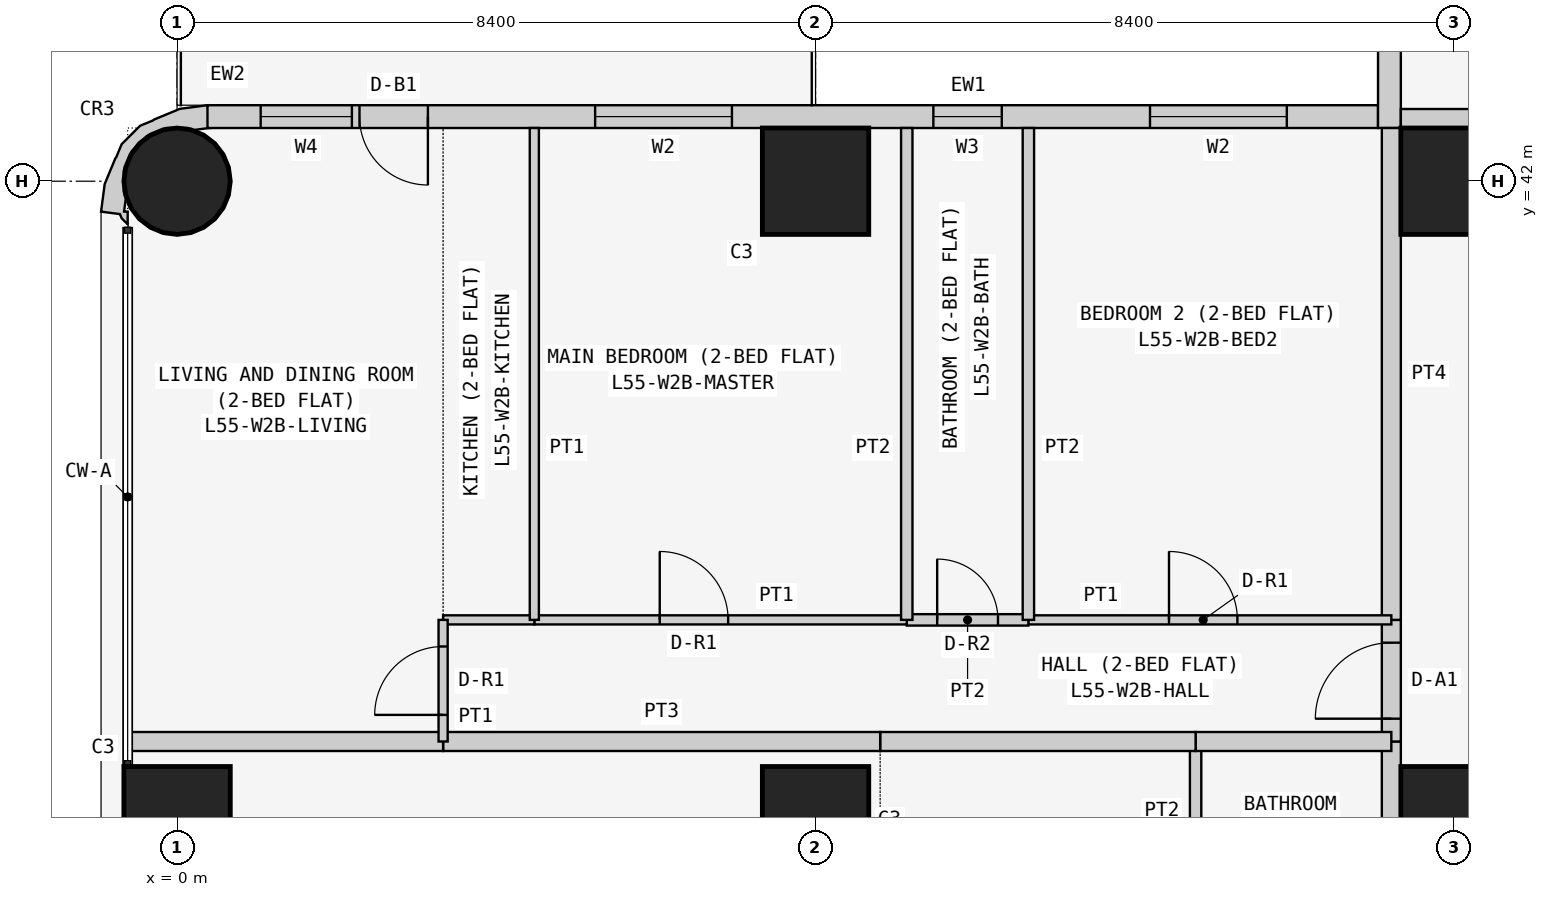
"""IFC4 building model, lengths in metres.
Left out: names, types, materials, properties, quantities, classifications, styles, units other than length and angle.
Written with IfcOpenShell. Run it as: python <this file> out.ifc"""

import sys

from ifc_helpers import new_model, si_unit, direction, frame, frame_2d, origin, origin_2d, place, context, subcontext, project, spatial, polyline, rectangle, circle, outline, extrude, element, fill, save


model = new_model("IFC4")
c1 = context("Model", 3, precision=1e-05, world=origin(), true_north=direction((0.0, 1.0)))
c2 = subcontext(c1, "Body", "Model", "MODEL_VIEW")
j1 = project(units=[si_unit("LENGTHUNIT", "METRE"), si_unit("PLANEANGLEUNIT", "RADIAN")], contexts=[c1])
p1 = place(None, origin())
s1 = spatial("IfcSite", under=j1, at=p1, CompositionType="ELEMENT")
p2 = place(p1, origin())
s2 = spatial("IfcBuilding", under=s1, at=p2, CompositionType="ELEMENT")
p3 = place(p2, frame((0.0, 0.0, 212.1)))
s3 = spatial("IfcBuildingStorey", under=s2, at=p3, CompositionType="ELEMENT", Elevation=212.1)
p4 = place(p3, frame((0.0, 33.6, 0.0), z_axis=(0.0, 0.0, 1.0), x_axis=(1.0, 0.0, 0.0)))
e1 = element("IfcColumn", 1, at=p4, inside=s3, PredefinedType="COLUMN", context=c2, shape_type="SweptSolid", body=[
    extrude(rectangle(XDim=1.4, YDim=1.4, at=origin_2d()), origin(), (0.0, 0.0, 1.0), 3.6),
])
p5 = place(p3, frame((0.0, 42.0, 0.0), z_axis=(0.0, 0.0, 1.0), x_axis=(1.0, 0.0, 0.0)))
e2 = element("IfcColumn", 2, at=p5, inside=s3, PredefinedType="COLUMN", context=c2, shape_type="SweptSolid", body=[
    extrude(circle(Radius=0.7, at=origin_2d()), origin(), (0.0, 0.0, 1.0), 3.6),
])
for number, where, z_axis, x_axis in (
    (3, (8.4, 33.6, 0.0), (0.0, 0.0, 1.0), (1.0, 0.0, 0.0)),
    (4, (8.4, 42.0, 0.0), (0.0, 0.0, 1.0), (1.0, 0.0, 0.0)),
    (5, (16.8, 33.6, 0.0), (0.0, 0.0, 1.0), (1.0, 0.0, 0.0)),
    (6, (16.8, 42.0, 0.0), (0.0, 0.0, 1.0), (1.0, 0.0, 0.0)),
):
    element("IfcColumn", number, at=place(p3, frame(where, z_axis=z_axis, x_axis=x_axis)), inside=s3, PredefinedType="COLUMN", context=c2, shape_type="SweptSolid", body=[
        extrude(rectangle(XDim=1.4, YDim=1.4, at=origin_2d()), origin(), (0.0, 0.0, 1.0), 3.6),
    ])
p6 = place(p3, frame((15.8, 42.85, 0.0), z_axis=(0.0, 0.0, 1.0), x_axis=(-1.0, 0.0, 0.0)))
e7 = element("IfcWall", 7, at=p6, inside=s3, PredefinedType="SOLIDWALL", context=c2, shape_type="SweptSolid", body=[
    extrude(rectangle(XDim=15.4, YDim=0.3, at=frame_2d((7.7, 0.0))), origin(), (0.0, 0.0, 1.0), 3.45),
])
p7 = place(p6, frame((1.2, 0.0, 0.9)))
e8 = element("IfcOpeningElement", 8, at=p7, cuts=e7, PredefinedType="OPENING", context=c2, shape_type="SweptSolid", body=[
    extrude(rectangle(XDim=1.8, YDim=1.5, at=frame_2d((0.9, 0.75))), frame((0.0, 0.16, 0.0), z_axis=(0.0, -1.0, 0.0), x_axis=(1.0, 0.0, 0.0)), (0.0, 0.0, 1.0), 0.32),
])
p8 = place(p6, frame((4.95, 0.0, 1.5)))
e9 = element("IfcOpeningElement", 9, at=p8, cuts=e7, PredefinedType="OPENING", context=c2, shape_type="SweptSolid", body=[
    extrude(rectangle(XDim=0.9, YDim=0.7, at=frame_2d((0.45, 0.35))), frame((0.0, 0.16, 0.0), z_axis=(0.0, -1.0, 0.0), x_axis=(1.0, 0.0, 0.0)), (0.0, 0.0, 1.0), 0.32),
])
p9 = place(p6, frame((8.5, 0.0, 0.9)))
e10 = element("IfcOpeningElement", 10, at=p9, cuts=e7, PredefinedType="OPENING", context=c2, shape_type="SweptSolid", body=[
    extrude(rectangle(XDim=1.8, YDim=1.5, at=frame_2d((0.9, 0.75))), frame((0.0, 0.16, 0.0), z_axis=(0.0, -1.0, 0.0), x_axis=(1.0, 0.0, 0.0)), (0.0, 0.0, 1.0), 0.32),
])
p10 = place(p6, frame((12.5, 0.0, 0.0)))
e11 = element("IfcOpeningElement", 11, at=p10, cuts=e7, PredefinedType="OPENING", context=c2, shape_type="SweptSolid", body=[
    extrude(rectangle(XDim=0.9, YDim=2.4, at=frame_2d((0.45, 1.2))), frame((0.0, 0.16, 0.0), z_axis=(0.0, -1.0, 0.0), x_axis=(1.0, 0.0, 0.0)), (0.0, 0.0, 1.0), 0.32),
])
p11 = place(p6, frame((13.5, 0.0, 0.9)))
e12 = element("IfcOpeningElement", 12, at=p11, cuts=e7, PredefinedType="OPENING", context=c2, shape_type="SweptSolid", body=[
    extrude(rectangle(XDim=1.2, YDim=1.5, at=frame_2d((0.6, 0.75))), frame((0.0, 0.16, 0.0), z_axis=(0.0, -1.0, 0.0), x_axis=(1.0, 0.0, 0.0)), (0.0, 0.0, 1.0), 0.32),
])
p12 = place(p3, frame((15.95, 50.0, 0.0), z_axis=(0.0, 0.0, 1.0), x_axis=(0.0, -1.0, 0.0)))
e13 = element("IfcWall", 13, at=p12, inside=s3, PredefinedType="SOLIDWALL", context=c2, shape_type="SweptSolid", body=[
    extrude(rectangle(XDim=7.3, YDim=0.3, at=frame_2d((3.65, 0.0))), origin(), (0.0, 0.0, 1.0), 3.45),
])
p13 = place(p12, frame((3.1, 0.0, 0.9)))
e14 = element("IfcOpeningElement", 14, at=p13, cuts=e13, PredefinedType="OPENING", context=c2, shape_type="SweptSolid", body=[
    extrude(rectangle(XDim=2.4, YDim=1.5, at=frame_2d((1.2, 0.75))), frame((0.0, 0.16, 0.0), z_axis=(0.0, -1.0, 0.0), x_axis=(1.0, 0.0, 0.0)), (0.0, 0.0, 1.0), 0.32),
])
p14 = place(p12, frame((0.75, 0.0, 0.9)))
e15 = element("IfcOpeningElement", 15, at=p14, cuts=e13, PredefinedType="OPENING", context=c2, shape_type="SweptSolid", body=[
    extrude(rectangle(XDim=1.2, YDim=1.5, at=frame_2d((0.6, 0.75))), frame((0.0, 0.16, 0.0), z_axis=(0.0, -1.0, 0.0), x_axis=(1.0, 0.0, 0.0)), (0.0, 0.0, 1.0), 0.32),
])
p15 = place(p3, frame((0.29, 42.724, 0.0), z_axis=(0.0, 0.0, 1.0), x_axis=(-0.898030234854, 0.439933741929, 0.0)))
e16 = element("IfcWall", 16, at=p15, inside=s3, PredefinedType="SOLIDWALL", context=c2, shape_type="SweptSolid", body=[
    extrude(outline(polyline([(-0.145, -0.044), (0.022, -0.296), (0.327, -0.094), (0.568, 0.18), (0.578, 0.199), (0.7, 0.338), (0.811, 0.661), (0.799, 0.846), (0.803, 0.866), (0.78, 1.231), (0.664, 1.577), (0.426, 1.497), (0.382, 1.536), (0.276, 1.572), (0.349, 1.423), (0.392, 1.444), (0.453, 1.261), (0.51, 1.211), (0.632, 0.961), (0.65, 0.683), (0.56, 0.419), (0.375, 0.21), (0.125, 0.087), (0.05, 0.082), (-0.127, -0.035), (-0.145, -0.044)])), origin(), (0.0, 0.0, 1.0), 3.45),
])
p16 = place(p3, frame((16.1, 42.825, 0.0), z_axis=(0.0, 0.0, 1.0), x_axis=(1.0, 0.0, 0.0)))
e17 = element("IfcWall", 17, at=p16, inside=s3, PredefinedType="PARTITIONING", context=c2, shape_type="SweptSolid", body=[
    extrude(rectangle(XDim=6.871, YDim=0.25, at=frame_2d((3.436, 0.0))), origin(), (0.0, 0.0, 1.0), 3.45),
])
p17 = place(p3, frame((15.975, 32.0, 0.0), z_axis=(0.0, 0.0, 1.0), x_axis=(0.0, 1.0, 0.0)))
e18 = element("IfcWall", 18, at=p17, inside=s3, PredefinedType="PARTITIONING", context=c2, shape_type="SweptSolid", body=[
    extrude(rectangle(XDim=2.629, YDim=0.25, at=frame_2d((1.314, 0.0))), origin(), (0.0, 0.0, 1.0), 3.45),
])
p18 = place(p3, frame((15.975, 34.629, 0.0), z_axis=(0.0, 0.0, 1.0), x_axis=(0.0, 1.0, 0.0)))
e19 = element("IfcWall", 19, at=p18, inside=s3, PredefinedType="PARTITIONING", context=c2, shape_type="SweptSolid", body=[
    extrude(rectangle(XDim=1.6, YDim=0.25, at=frame_2d((0.8, 0.0))), origin(), (0.0, 0.0, 1.0), 3.45),
])
p19 = place(p18, frame((0.3, 0.0, 0.0)))
e20 = element("IfcOpeningElement", 20, at=p19, cuts=e19, PredefinedType="OPENING", context=c2, shape_type="SweptSolid", body=[
    extrude(rectangle(XDim=1.0, YDim=2.1, at=frame_2d((0.5, 1.05))), frame((0.0, 0.135, 0.0), z_axis=(0.0, -1.0, 0.0), x_axis=(1.0, 0.0, 0.0)), (0.0, 0.0, 1.0), 0.27),
])
p20 = place(p3, frame((15.975, 36.229, 0.0), z_axis=(0.0, 0.0, 1.0), x_axis=(0.0, 1.0, 0.0)))
e21 = element("IfcWall", 21, at=p20, inside=s3, PredefinedType="PARTITIONING", context=c2, shape_type="SweptSolid", body=[
    extrude(rectangle(XDim=6.471, YDim=0.25, at=frame_2d((3.235, 0.0))), origin(), (0.0, 0.0, 1.0), 3.45),
])
p21 = place(p3, frame((13.4, 32.0, 0.0), z_axis=(0.0, 0.0, 1.0), x_axis=(0.0, 1.0, 0.0)))
e22 = element("IfcWall", 22, at=p21, inside=s3, PredefinedType="PARTITIONING", context=c2, shape_type="SweptSolid", body=[
    extrude(rectangle(XDim=2.629, YDim=0.15, at=frame_2d((1.314, 0.0))), origin(), (0.0, 0.0, 1.0), 3.45),
])
p22 = place(p3, frame((13.4, 34.629, 0.0), z_axis=(0.0, 0.0, 1.0), x_axis=(1.0, 0.0, 0.0)))
e23 = element("IfcWall", 23, at=p22, inside=s3, PredefinedType="PARTITIONING", context=c2, shape_type="SweptSolid", body=[
    extrude(rectangle(XDim=2.575, YDim=0.25, at=frame_2d((1.288, 0.0))), origin(), (0.0, 0.0, 1.0), 3.45),
])
p23 = place(p3, frame((9.25, 34.629, 0.0), z_axis=(0.0, 0.0, 1.0), x_axis=(1.0, 0.0, 0.0)))
e24 = element("IfcWall", 24, at=p23, inside=s3, PredefinedType="PARTITIONING", context=c2, shape_type="SweptSolid", body=[
    extrude(rectangle(XDim=4.15, YDim=0.25, at=frame_2d((2.075, 0.0))), origin(), (0.0, 0.0, 1.0), 3.45),
])
p24 = place(p3, frame((3.5, 34.629, 0.0), z_axis=(0.0, 0.0, 1.0), x_axis=(1.0, 0.0, 0.0)))
e25 = element("IfcWall", 25, at=p24, inside=s3, PredefinedType="PARTITIONING", context=c2, shape_type="SweptSolid", body=[
    extrude(rectangle(XDim=5.75, YDim=0.25, at=frame_2d((2.875, 0.0))), origin(), (0.0, 0.0, 1.0), 3.45),
])
p25 = place(p3, frame((-0.65, 34.629, 0.0), z_axis=(0.0, 0.0, 1.0), x_axis=(1.0, 0.0, 0.0)))
e26 = element("IfcWall", 26, at=p25, inside=s3, PredefinedType="PARTITIONING", context=c2, shape_type="SweptSolid", body=[
    extrude(rectangle(XDim=4.15, YDim=0.25, at=frame_2d((2.075, 0.0))), origin(), (0.0, 0.0, 1.0), 3.45),
])
p26 = place(p3, frame((11.2, 36.229, 0.0), z_axis=(0.0, 0.0, 1.0), x_axis=(1.0, 0.0, 0.0)))
e27 = element("IfcWall", 27, at=p26, inside=s3, PredefinedType="PARTITIONING", context=c2, shape_type="SweptSolid", body=[
    extrude(rectangle(XDim=4.775, YDim=0.12, at=frame_2d((2.388, 0.0))), origin(), (0.0, 0.0, 1.0), 3.45),
])
p27 = place(p26, frame((1.85, 0.0, 0.0)))
e28 = element("IfcOpeningElement", 28, at=p27, cuts=e27, PredefinedType="OPENING", context=c2, shape_type="SweptSolid", body=[
    extrude(rectangle(XDim=0.9, YDim=2.1, at=frame_2d((0.45, 1.05))), frame((0.0, 0.07, 0.0), z_axis=(0.0, -1.0, 0.0), x_axis=(1.0, 0.0, 0.0)), (0.0, 0.0, 1.0), 0.14),
])
p28 = place(p3, frame((9.6, 36.229, 0.0), z_axis=(0.0, 0.0, 1.0), x_axis=(1.0, 0.0, 0.0)))
e29 = element("IfcWall", 29, at=p28, inside=s3, PredefinedType="PARTITIONING", context=c2, shape_type="SweptSolid", body=[
    extrude(rectangle(XDim=1.6, YDim=0.15, at=frame_2d((0.8, 0.0))), origin(), (0.0, 0.0, 1.0), 3.45),
])
p29 = place(p28, frame((0.4, 0.0, 0.0)))
e30 = element("IfcOpeningElement", 30, at=p29, cuts=e29, PredefinedType="OPENING", context=c2, shape_type="SweptSolid", body=[
    extrude(rectangle(XDim=0.8, YDim=2.1, at=frame_2d((0.4, 1.05))), frame((0.0, 0.085, 0.0), z_axis=(0.0, -1.0, 0.0), x_axis=(1.0, 0.0, 0.0)), (0.0, 0.0, 1.0), 0.17),
])
p30 = place(p3, frame((4.7, 36.229, 0.0), z_axis=(0.0, 0.0, 1.0), x_axis=(1.0, 0.0, 0.0)))
e31 = element("IfcWall", 31, at=p30, inside=s3, PredefinedType="PARTITIONING", context=c2, shape_type="SweptSolid", body=[
    extrude(rectangle(XDim=4.9, YDim=0.12, at=frame_2d((2.45, 0.0))), origin(), (0.0, 0.0, 1.0), 3.45),
])
p31 = place(p30, frame((1.65, 0.0, 0.0)))
e32 = element("IfcOpeningElement", 32, at=p31, cuts=e31, PredefinedType="OPENING", context=c2, shape_type="SweptSolid", body=[
    extrude(rectangle(XDim=0.9, YDim=2.1, at=frame_2d((0.45, 1.05))), frame((0.0, 0.07, 0.0), z_axis=(0.0, -1.0, 0.0), x_axis=(1.0, 0.0, 0.0)), (0.0, 0.0, 1.0), 0.14),
])
p32 = place(p3, frame((3.5, 36.229, 0.0), z_axis=(0.0, 0.0, 1.0), x_axis=(1.0, 0.0, 0.0)))
e33 = element("IfcWall", 33, at=p32, inside=s3, PredefinedType="PARTITIONING", context=c2, shape_type="SweptSolid", body=[
    extrude(rectangle(XDim=1.2, YDim=0.12, at=frame_2d((0.6, 0.0))), origin(), (0.0, 0.0, 1.0), 3.45),
])
p33 = place(p3, frame((3.5, 34.629, 0.0), z_axis=(0.0, 0.0, 1.0), x_axis=(0.0, 1.0, 0.0)))
e34 = element("IfcWall", 34, at=p33, inside=s3, PredefinedType="PARTITIONING", context=c2, shape_type="SweptSolid", body=[
    extrude(rectangle(XDim=1.6, YDim=0.12, at=frame_2d((0.8, 0.0))), origin(), (0.0, 0.0, 1.0), 3.45),
])
p34 = place(p33, frame((0.35, 0.0, 0.0)))
e35 = element("IfcOpeningElement", 35, at=p34, cuts=e34, PredefinedType="OPENING", context=c2, shape_type="SweptSolid", body=[
    extrude(rectangle(XDim=0.9, YDim=2.1, at=frame_2d((0.45, 1.05))), frame((0.0, 0.07, 0.0), z_axis=(0.0, -1.0, 0.0), x_axis=(1.0, 0.0, 0.0)), (0.0, 0.0, 1.0), 0.14),
])
for number, where, z_axis, x_axis in (
    (36, (11.2, 36.229, 0.0), (0.0, 0.0, 1.0), (0.0, 1.0, 0.0)),
    (37, (9.6, 36.229, 0.0), (0.0, 0.0, 1.0), (0.0, 1.0, 0.0)),
):
    element("IfcWall", number, at=place(p3, frame(where, z_axis=z_axis, x_axis=x_axis)), inside=s3, PredefinedType="PARTITIONING", context=c2, shape_type="SweptSolid", body=[
        extrude(rectangle(XDim=6.471, YDim=0.15, at=frame_2d((3.235, 0.0))), origin(), (0.0, 0.0, 1.0), 3.45),
    ])
p35 = place(p3, frame((4.7, 36.229, 0.0), z_axis=(0.0, 0.0, 1.0), x_axis=(0.0, 1.0, 0.0)))
e38 = element("IfcWall", 38, at=p35, inside=s3, PredefinedType="PARTITIONING", context=c2, shape_type="SweptSolid", body=[
    extrude(rectangle(XDim=6.471, YDim=0.12, at=frame_2d((3.235, 0.0))), origin(), (0.0, 0.0, 1.0), 3.45),
])
p36 = place(p7, origin())
e39 = element("IfcWindow", 39, at=p36, inside=s3, PartitioningType="SINGLE_PANEL", PredefinedType="WINDOW", context=c2, shape_type="SweptSolid", body=[
    extrude(rectangle(XDim=1.8, YDim=1.5, at=frame_2d((0.9, 0.75))), frame((0.0, 0.03, 0.0), z_axis=(0.0, -1.0, 0.0), x_axis=(1.0, 0.0, 0.0)), (0.0, 0.0, 1.0), 0.06),
])
fill(e8, e39)
p37 = place(p8, origin())
e40 = element("IfcWindow", 40, at=p37, inside=s3, PartitioningType="SINGLE_PANEL", PredefinedType="WINDOW", context=c2, shape_type="SweptSolid", body=[
    extrude(rectangle(XDim=0.9, YDim=0.7, at=frame_2d((0.45, 0.35))), frame((0.0, 0.03, 0.0), z_axis=(0.0, -1.0, 0.0), x_axis=(1.0, 0.0, 0.0)), (0.0, 0.0, 1.0), 0.06),
])
fill(e9, e40)
p38 = place(p9, origin())
e41 = element("IfcWindow", 41, at=p38, inside=s3, PartitioningType="SINGLE_PANEL", PredefinedType="WINDOW", context=c2, shape_type="SweptSolid", body=[
    extrude(rectangle(XDim=1.8, YDim=1.5, at=frame_2d((0.9, 0.75))), frame((0.0, 0.03, 0.0), z_axis=(0.0, -1.0, 0.0), x_axis=(1.0, 0.0, 0.0)), (0.0, 0.0, 1.0), 0.06),
])
fill(e10, e41)
p39 = place(p10, origin())
e42 = element("IfcDoor", 42, at=p39, inside=s3, OperationType="SINGLE_SWING_LEFT", PredefinedType="DOOR", context=c2, shape_type="SweptSolid", body=[
    extrude(rectangle(XDim=0.9, YDim=2.4, at=frame_2d((0.45, 1.2))), frame((0.0, 0.025, 0.0), z_axis=(0.0, -1.0, 0.0), x_axis=(1.0, 0.0, 0.0)), (0.0, 0.0, 1.0), 0.05),
])
fill(e11, e42)
p40 = place(p11, origin())
e43 = element("IfcWindow", 43, at=p40, inside=s3, PartitioningType="SINGLE_PANEL", PredefinedType="WINDOW", context=c2, shape_type="SweptSolid", body=[
    extrude(rectangle(XDim=1.2, YDim=1.5, at=frame_2d((0.6, 0.75))), frame((0.0, 0.03, 0.0), z_axis=(0.0, -1.0, 0.0), x_axis=(1.0, 0.0, 0.0)), (0.0, 0.0, 1.0), 0.06),
])
fill(e12, e43)
p41 = place(p19, origin())
e44 = element("IfcDoor", 44, at=p41, inside=s3, OperationType="SINGLE_SWING_LEFT", PredefinedType="DOOR", context=c2, shape_type="SweptSolid", body=[
    extrude(rectangle(XDim=1.0, YDim=2.1, at=frame_2d((0.5, 1.05))), frame((0.0, 0.025, 0.0), z_axis=(0.0, -1.0, 0.0), x_axis=(1.0, 0.0, 0.0)), (0.0, 0.0, 1.0), 0.05),
])
fill(e20, e44)
p42 = place(p27, origin())
e45 = element("IfcDoor", 45, at=p42, inside=s3, OperationType="SINGLE_SWING_LEFT", PredefinedType="DOOR", context=c2, shape_type="SweptSolid", body=[
    extrude(rectangle(XDim=0.9, YDim=2.1, at=frame_2d((0.45, 1.05))), frame((0.0, 0.025, 0.0), z_axis=(0.0, -1.0, 0.0), x_axis=(1.0, 0.0, 0.0)), (0.0, 0.0, 1.0), 0.05),
])
fill(e28, e45)
p43 = place(p29, origin())
e46 = element("IfcDoor", 46, at=p43, inside=s3, OperationType="SINGLE_SWING_LEFT", PredefinedType="DOOR", context=c2, shape_type="SweptSolid", body=[
    extrude(rectangle(XDim=0.8, YDim=2.1, at=frame_2d((0.4, 1.05))), frame((0.0, 0.025, 0.0), z_axis=(0.0, -1.0, 0.0), x_axis=(1.0, 0.0, 0.0)), (0.0, 0.0, 1.0), 0.05),
])
fill(e30, e46)
p44 = place(p31, origin())
e47 = element("IfcDoor", 47, at=p44, inside=s3, OperationType="SINGLE_SWING_LEFT", PredefinedType="DOOR", context=c2, shape_type="SweptSolid", body=[
    extrude(rectangle(XDim=0.9, YDim=2.1, at=frame_2d((0.45, 1.05))), frame((0.0, 0.025, 0.0), z_axis=(0.0, -1.0, 0.0), x_axis=(1.0, 0.0, 0.0)), (0.0, 0.0, 1.0), 0.05),
])
fill(e32, e47)
p45 = place(p34, origin())
e48 = element("IfcDoor", 48, at=p45, inside=s3, OperationType="SINGLE_SWING_LEFT", PredefinedType="DOOR", context=c2, shape_type="SweptSolid", body=[
    extrude(rectangle(XDim=0.9, YDim=2.1, at=frame_2d((0.45, 1.05))), frame((0.0, 0.025, 0.0), z_axis=(0.0, -1.0, 0.0), x_axis=(1.0, 0.0, 0.0)), (0.0, 0.0, 1.0), 0.05),
])
fill(e35, e48)
save(model, sys.argv[1])
